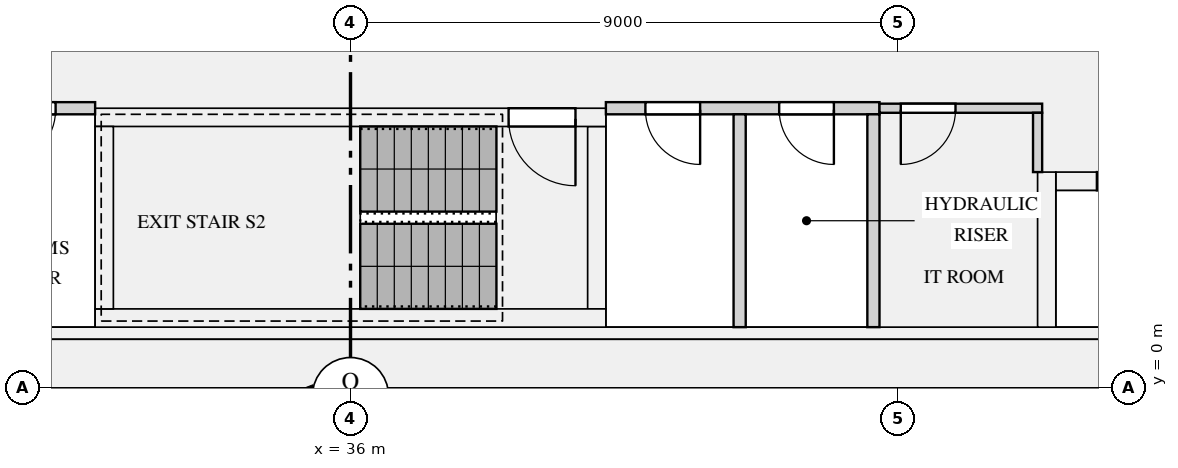
"""IFC4 building model, lengths in metres.
Left out: names, types, materials, properties, quantities, classifications, styles, units other than length and angle.
Written with IfcOpenShell. Run it as: python <this file> out.ifc"""

import sys

from ifc_helpers import new_model, si_unit, direction, frame, frame_2d, origin, place, context, subcontext, project, spatial, rectangle, extrude, element, fill, save


model = new_model("IFC4")
c1 = context("Model", 3, precision=1e-05, world=origin(), true_north=direction((0.0, 1.0)))
c2 = subcontext(c1, "Body", "Model", "MODEL_VIEW")
j1 = project(units=[si_unit("LENGTHUNIT", "METRE"), si_unit("PLANEANGLEUNIT", "RADIAN")], contexts=[c1])
p1 = place(None, origin())
s1 = spatial("IfcSite", under=j1, at=p1, CompositionType="ELEMENT")
p2 = place(p1, origin())
s2 = spatial("IfcBuilding", under=s1, at=p2, CompositionType="ELEMENT")
p3 = place(p2, frame((0.0, 0.0, 124.5)))
s3 = spatial("IfcBuildingStorey", under=s2, at=p3, CompositionType="ELEMENT", Elevation=124.5)
p4 = place(p3, frame((18.8, 0.4, 0.0), z_axis=(0.0, 0.0, 1.0), x_axis=(1.0, 0.0, 0.0)))
e1 = element("IfcWall", 1, at=p4, inside=s3, PredefinedType="SHEAR", context=c2, shape_type="SweptSolid", body=[
    extrude(rectangle(XDim=34.4, YDim=0.8, at=frame_2d((17.2, 0.0))), origin(), (0.0, 0.0, 1.0), 3.15),
])
p5 = place(p3, frame((18.8, 0.9, 0.0), z_axis=(0.0, 0.0, 1.0), x_axis=(1.0, 0.0, 0.0)))
e2 = element("IfcWall", 2, at=p5, inside=s3, PredefinedType="SHEAR", context=c2, shape_type="SweptSolid", body=[
    extrude(rectangle(XDim=34.4, YDim=0.2, at=frame_2d((17.2, 0.0))), origin(), (0.0, 0.0, 1.0), 3.15),
])
p6 = place(p3, frame((47.6, 3.4, 0.0), z_axis=(0.0, 0.0, 1.0), x_axis=(1.0, 0.0, 0.0)))
e3 = element("IfcWall", 3, at=p6, inside=s3, PredefinedType="SHEAR", context=c2, shape_type="SweptSolid", body=[
    extrude(rectangle(XDim=2.55, YDim=0.3, at=frame_2d((1.275, 0.0))), origin(), (0.0, 0.0, 1.0), 3.15),
])
p7 = place(p6, frame((0.675, 0.0, 0.0)))
e4 = element("IfcOpeningElement", 4, at=p7, cuts=e3, PredefinedType="OPENING", context=c2, shape_type="SweptSolid", body=[
    extrude(rectangle(XDim=1.2, YDim=2.1, at=frame_2d((0.6, 1.05))), frame((0.0, 0.16, 0.0), z_axis=(0.0, -1.0, 0.0), x_axis=(1.0, 0.0, 0.0)), (0.0, 0.0, 1.0), 0.32),
])
p8 = place(p3, frame((47.45, 1.0, 0.0), z_axis=(0.0, 0.0, 1.0), x_axis=(0.0, 1.0, 0.0)))
e5 = element("IfcWall", 5, at=p8, inside=s3, PredefinedType="SHEAR", context=c2, shape_type="SweptSolid", body=[
    extrude(rectangle(XDim=2.55, YDim=0.3, at=frame_2d((1.275, 0.0))), origin(), (0.0, 0.0, 1.0), 3.15),
])
p9 = place(p3, frame((31.8, 1.15, 0.0), z_axis=(0.0, 0.0, 1.0), x_axis=(1.0, 0.0, 0.0)))
e6 = element("IfcWall", 6, at=p9, inside=s3, PredefinedType="SHEAR", context=c2, shape_type="SweptSolid", body=[
    extrude(rectangle(XDim=8.4, YDim=0.3, at=frame_2d((4.2, 0.0))), origin(), (0.0, 0.0, 1.0), 3.15),
])
p10 = place(p3, frame((31.8, 4.45, 0.0), z_axis=(0.0, 0.0, 1.0), x_axis=(1.0, 0.0, 0.0)))
e7 = element("IfcWall", 7, at=p10, inside=s3, PredefinedType="SHEAR", context=c2, shape_type="SweptSolid", body=[
    extrude(rectangle(XDim=8.4, YDim=0.3, at=frame_2d((4.2, 0.0))), origin(), (0.0, 0.0, 1.0), 3.15),
])
p11 = place(p10, frame((6.8, 0.0, 0.0)))
e8 = element("IfcOpeningElement", 8, at=p11, cuts=e7, PredefinedType="OPENING", context=c2, shape_type="SweptSolid", body=[
    extrude(rectangle(XDim=1.1, YDim=2.1, at=frame_2d((0.55, 1.05))), frame((0.0, 0.16, 0.0), z_axis=(0.0, -1.0, 0.0), x_axis=(1.0, 0.0, 0.0)), (0.0, 0.0, 1.0), 0.32),
])
for number, where, z_axis, x_axis in (
    (9, (31.95, 1.3, 0.0), (0.0, 0.0, 1.0), (0.0, 1.0, 0.0)),
    (10, (40.05, 1.3, 0.0), (0.0, 0.0, 1.0), (0.0, 1.0, 0.0)),
):
    element("IfcWall", number, at=place(p3, frame(where, z_axis=z_axis, x_axis=x_axis)), inside=s3, PredefinedType="SHEAR", context=c2, shape_type="SweptSolid", body=[
        extrude(rectangle(XDim=3.0, YDim=0.3, at=frame_2d((1.5, 0.0))), origin(), (0.0, 0.0, 1.0), 3.15),
    ])
p12 = place(p3, frame((27.3, 4.6, 0.0), z_axis=(0.0, 0.0, 1.0), x_axis=(1.0, 0.0, 0.0)))
e11 = element("IfcWall", 11, at=p12, inside=s3, PredefinedType="PARTITIONING", context=c2, shape_type="SweptSolid", body=[
    extrude(rectangle(XDim=4.5, YDim=0.2, at=frame_2d((2.25, 0.0))), origin(), (0.0, 0.0, 1.0), 2.83),
])
p13 = place(p12, frame((0.75, 0.0, 0.0)))
e12 = element("IfcOpeningElement", 12, at=p13, cuts=e11, PredefinedType="OPENING", context=c2, shape_type="SweptSolid", body=[
    extrude(rectangle(XDim=0.9, YDim=2.1, at=frame_2d((0.45, 1.05))), frame((0.0, 0.11, 0.0), z_axis=(0.0, -1.0, 0.0), x_axis=(1.0, 0.0, 0.0)), (0.0, 0.0, 1.0), 0.22),
])
p14 = place(p12, frame((2.95, 0.0, 0.0)))
e13 = element("IfcOpeningElement", 13, at=p14, cuts=e11, PredefinedType="OPENING", context=c2, shape_type="SweptSolid", body=[
    extrude(rectangle(XDim=0.9, YDim=2.1, at=frame_2d((0.45, 1.05))), frame((0.0, 0.11, 0.0), z_axis=(0.0, -1.0, 0.0), x_axis=(1.0, 0.0, 0.0)), (0.0, 0.0, 1.0), 0.22),
])
p15 = place(p3, frame((40.2, 4.6, 0.0), z_axis=(0.0, 0.0, 1.0), x_axis=(1.0, 0.0, 0.0)))
e14 = element("IfcWall", 14, at=p15, inside=s3, PredefinedType="PARTITIONING", context=c2, shape_type="SweptSolid", body=[
    extrude(rectangle(XDim=4.5, YDim=0.2, at=frame_2d((2.25, 0.0))), origin(), (0.0, 0.0, 1.0), 2.83),
])
p16 = place(p15, frame((0.65, 0.0, 0.0)))
e15 = element("IfcOpeningElement", 15, at=p16, cuts=e14, PredefinedType="OPENING", context=c2, shape_type="SweptSolid", body=[
    extrude(rectangle(XDim=0.9, YDim=2.1, at=frame_2d((0.45, 1.05))), frame((0.0, 0.11, 0.0), z_axis=(0.0, -1.0, 0.0), x_axis=(1.0, 0.0, 0.0)), (0.0, 0.0, 1.0), 0.22),
])
p17 = place(p15, frame((2.85, 0.0, 0.0)))
e16 = element("IfcOpeningElement", 16, at=p17, cuts=e14, PredefinedType="OPENING", context=c2, shape_type="SweptSolid", body=[
    extrude(rectangle(XDim=0.9, YDim=2.1, at=frame_2d((0.45, 1.05))), frame((0.0, 0.11, 0.0), z_axis=(0.0, -1.0, 0.0), x_axis=(1.0, 0.0, 0.0)), (0.0, 0.0, 1.0), 0.22),
])
p18 = place(p3, frame((44.7, 4.6, 0.0), z_axis=(0.0, 0.0, 1.0), x_axis=(1.0, 0.0, 0.0)))
e17 = element("IfcWall", 17, at=p18, inside=s3, PredefinedType="PARTITIONING", context=c2, shape_type="SweptSolid", body=[
    extrude(rectangle(XDim=2.675, YDim=0.15, at=frame_2d((1.337, 0.0))), origin(), (0.0, 0.0, 1.0), 2.83),
])
p19 = place(p18, frame((0.35, 0.0, 0.0)))
e18 = element("IfcOpeningElement", 18, at=p19, cuts=e17, PredefinedType="OPENING", context=c2, shape_type="SweptSolid", body=[
    extrude(rectangle(XDim=0.9, YDim=2.1, at=frame_2d((0.45, 1.05))), frame((0.0, 0.085, 0.0), z_axis=(0.0, -1.0, 0.0), x_axis=(1.0, 0.0, 0.0)), (0.0, 0.0, 1.0), 0.17),
])
for number, where, z_axis, x_axis in (
    (19, (42.4, 1.0, 0.0), (0.0, 0.0, 1.0), (0.0, 1.0, 0.0)),
    (20, (44.6, 1.0, 0.0), (0.0, 0.0, 1.0), (0.0, 1.0, 0.0)),
):
    element("IfcWall", number, at=place(p3, frame(where, z_axis=z_axis, x_axis=x_axis)), inside=s3, PredefinedType="PARTITIONING", context=c2, shape_type="SweptSolid", body=[
        extrude(rectangle(XDim=3.5, YDim=0.2, at=frame_2d((1.75, 0.0))), origin(), (0.0, 0.0, 1.0), 2.83),
    ])
p20 = place(p3, frame((47.3, 3.55, 0.0), z_axis=(0.0, 0.0, 1.0), x_axis=(0.0, 1.0, 0.0)))
e21 = element("IfcWall", 21, at=p20, inside=s3, PredefinedType="PARTITIONING", context=c2, shape_type="SweptSolid", body=[
    extrude(rectangle(XDim=0.975, YDim=0.15, at=frame_2d((0.487, 0.0))), origin(), (0.0, 0.0, 1.0), 2.83),
])
p21 = place(p7, origin())
e22 = element("IfcDoor", 22, at=p21, inside=s3, OperationType="DOUBLE_DOOR_SLIDING", PredefinedType="DOOR", context=c2, shape_type="SweptSolid", body=[
    extrude(rectangle(XDim=1.2, YDim=2.1, at=frame_2d((0.6, 1.05))), frame((0.0, 0.025, 0.0), z_axis=(0.0, -1.0, 0.0), x_axis=(1.0, 0.0, 0.0)), (0.0, 0.0, 1.0), 0.05),
])
fill(e4, e22)
p22 = place(p11, frame((1.1, 0.0, 0.0), z_axis=(0.0, 0.0, 1.0), x_axis=(-1.0, 0.0, 0.0)))
e23 = element("IfcDoor", 23, at=p22, inside=s3, OperationType="SINGLE_SWING_LEFT", PredefinedType="DOOR", context=c2, shape_type="SweptSolid", body=[
    extrude(rectangle(XDim=1.1, YDim=2.1, at=frame_2d((0.55, 1.05))), frame((0.0, 0.025, 0.0), z_axis=(0.0, -1.0, 0.0), x_axis=(1.0, 0.0, 0.0)), (0.0, 0.0, 1.0), 0.05),
])
fill(e8, e23)
p23 = place(p19, frame((0.9, 0.0, 0.0), z_axis=(0.0, 0.0, 1.0), x_axis=(-1.0, 0.0, 0.0)))
e24 = element("IfcDoor", 24, at=p23, inside=s3, OperationType="SINGLE_SWING_RIGHT", PredefinedType="DOOR", context=c2, shape_type="SweptSolid", body=[
    extrude(rectangle(XDim=0.9, YDim=2.1, at=frame_2d((0.45, 1.05))), frame((0.0, 0.025, 0.0), z_axis=(0.0, -1.0, 0.0), x_axis=(1.0, 0.0, 0.0)), (0.0, 0.0, 1.0), 0.05),
])
fill(e18, e24)
p24 = place(p14, frame((0.9, 0.0, 0.0), z_axis=(0.0, 0.0, 1.0), x_axis=(-1.0, 0.0, 0.0)))
e25 = element("IfcDoor", 25, at=p24, inside=s3, OperationType="SINGLE_SWING_RIGHT", PredefinedType="DOOR", context=c2, shape_type="SweptSolid", body=[
    extrude(rectangle(XDim=0.9, YDim=2.1, at=frame_2d((0.45, 1.05))), frame((0.0, 0.025, 0.0), z_axis=(0.0, -1.0, 0.0), x_axis=(1.0, 0.0, 0.0)), (0.0, 0.0, 1.0), 0.05),
])
fill(e13, e25)
p25 = place(p16, frame((0.9, 0.0, 0.0), z_axis=(0.0, 0.0, 1.0), x_axis=(-1.0, 0.0, 0.0)))
e26 = element("IfcDoor", 26, at=p25, inside=s3, OperationType="SINGLE_SWING_LEFT", PredefinedType="DOOR", context=c2, shape_type="SweptSolid", body=[
    extrude(rectangle(XDim=0.9, YDim=2.1, at=frame_2d((0.45, 1.05))), frame((0.0, 0.025, 0.0), z_axis=(0.0, -1.0, 0.0), x_axis=(1.0, 0.0, 0.0)), (0.0, 0.0, 1.0), 0.05),
])
fill(e15, e26)
p26 = place(p17, frame((0.9, 0.0, 0.0), z_axis=(0.0, 0.0, 1.0), x_axis=(-1.0, 0.0, 0.0)))
e27 = element("IfcDoor", 27, at=p26, inside=s3, OperationType="SINGLE_SWING_LEFT", PredefinedType="DOOR", context=c2, shape_type="SweptSolid", body=[
    extrude(rectangle(XDim=0.9, YDim=2.1, at=frame_2d((0.45, 1.05))), frame((0.0, 0.025, 0.0), z_axis=(0.0, -1.0, 0.0), x_axis=(1.0, 0.0, 0.0)), (0.0, 0.0, 1.0), 0.05),
])
fill(e16, e27)
save(model, sys.argv[1])
